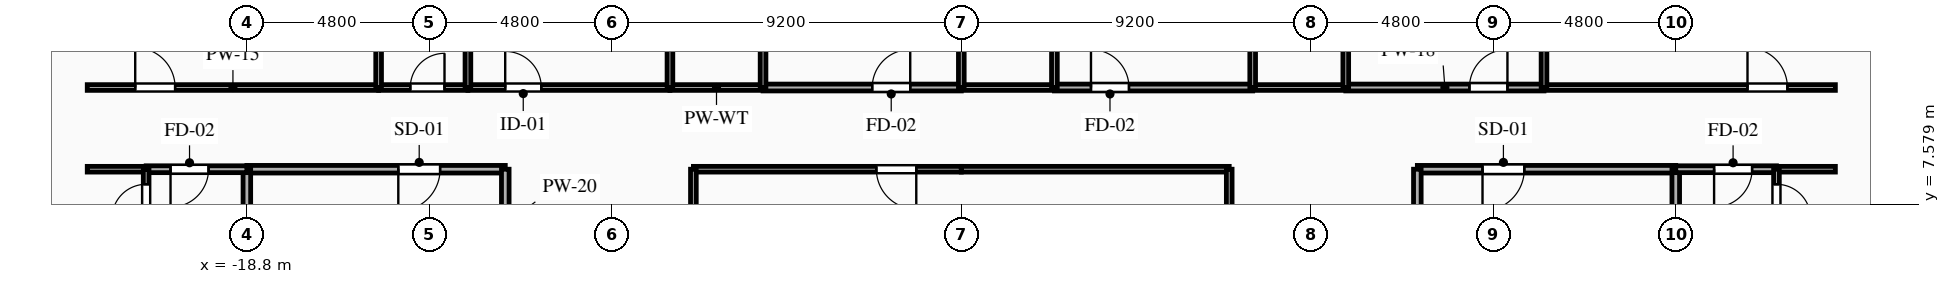
"""IFC4 building model, lengths in metres.
Left out: names, types, materials, properties, quantities, classifications, styles, units other than length and angle.
Written with IfcOpenShell. Run it as: python <this file> out.ifc"""

import sys

from ifc_helpers import new_model, si_unit, direction, frame, frame_2d, origin, place, context, subcontext, project, spatial, rectangle, extrude, element, fill, save


model = new_model("IFC4")
c1 = context("Model", 3, precision=1e-05, world=origin(), true_north=direction((0.0, 1.0)))
c2 = subcontext(c1, "Body", "Model", "MODEL_VIEW")
j1 = project(units=[si_unit("LENGTHUNIT", "METRE"), si_unit("PLANEANGLEUNIT", "RADIAN")], contexts=[c1])
p1 = place(None, origin())
s1 = spatial("IfcSite", under=j1, at=p1, CompositionType="ELEMENT")
p2 = place(p1, origin())
s2 = spatial("IfcBuilding", under=s1, at=p2, CompositionType="ELEMENT")
p3 = place(p2, frame((0.0, 0.0, 47.1)))
s3 = spatial("IfcBuildingStorey", under=s2, at=p3, CompositionType="ELEMENT", Elevation=47.1)
p4 = place(p3, frame((-12.0, 8.5, 0.0), z_axis=(0.0, 0.0, 1.0), x_axis=(-1.0, 0.0, 0.0)))
e1 = element("IfcWall", 1, at=p4, inside=s3, PredefinedType="PARTITIONING", context=c2, shape_type="SweptSolid", body=[
    extrude(rectangle(XDim=6.8, YDim=0.2, at=frame_2d((3.4, 0.0))), origin(), (0.0, 0.0, 1.0), 3.035),
])
p5 = place(p4, frame((1.715, 0.0, 0.0)))
e2 = element("IfcOpeningElement", 2, at=p5, cuts=e1, PredefinedType="OPENING", context=c2, shape_type="SweptSolid", body=[
    extrude(rectangle(XDim=1.1, YDim=2.15, at=frame_2d((0.55, 1.075))), frame((0.0, 0.11, 0.0), z_axis=(0.0, -1.0, 0.0), x_axis=(1.0, 0.0, 0.0)), (0.0, 0.0, 1.0), 0.22),
])
p6 = place(p3, frame((-12.0, 5.6, 0.0), z_axis=(0.0, 0.0, 1.0), x_axis=(0.0, 1.0, 0.0)))
e3 = element("IfcWall", 3, at=p6, inside=s3, PredefinedType="PARTITIONING", context=c2, shape_type="SweptSolid", body=[
    extrude(rectangle(XDim=2.9, YDim=0.2, at=frame_2d((1.45, 0.0))), origin(), (0.0, 0.0, 1.0), 3.035),
])
p7 = place(p3, frame((-18.8, 8.5, 0.0), z_axis=(0.0, 0.0, 1.0), x_axis=(0.0, -1.0, 0.0)))
e4 = element("IfcWall", 4, at=p7, inside=s3, PredefinedType="PARTITIONING", context=c2, shape_type="SweptSolid", body=[
    extrude(rectangle(XDim=2.9, YDim=0.2, at=frame_2d((1.45, 0.0))), origin(), (0.0, 0.0, 1.0), 2.52),
])
p8 = place(p3, frame((18.8, 8.5, 0.0), z_axis=(0.0, 0.0, 1.0), x_axis=(-1.0, 0.0, 0.0)))
e5 = element("IfcWall", 5, at=p8, inside=s3, PredefinedType="PARTITIONING", context=c2, shape_type="SweptSolid", body=[
    extrude(rectangle(XDim=6.8, YDim=0.2, at=frame_2d((3.4, 0.0))), origin(), (0.0, 0.0, 1.0), 3.035),
])
p9 = place(p8, frame((3.985, 0.0, 0.0)))
e6 = element("IfcOpeningElement", 6, at=p9, cuts=e5, PredefinedType="OPENING", context=c2, shape_type="SweptSolid", body=[
    extrude(rectangle(XDim=1.1, YDim=2.15, at=frame_2d((0.55, 1.075))), frame((0.0, 0.11, 0.0), z_axis=(0.0, -1.0, 0.0), x_axis=(1.0, 0.0, 0.0)), (0.0, 0.0, 1.0), 0.22),
])
p10 = place(p3, frame((12.0, 8.5, 0.0), z_axis=(0.0, 0.0, 1.0), x_axis=(0.0, -1.0, 0.0)))
e7 = element("IfcWall", 7, at=p10, inside=s3, PredefinedType="PARTITIONING", context=c2, shape_type="SweptSolid", body=[
    extrude(rectangle(XDim=2.9, YDim=0.2, at=frame_2d((1.45, 0.0))), origin(), (0.0, 0.0, 1.0), 3.035),
])
p11 = place(p3, frame((18.8, 5.6, 0.0), z_axis=(0.0, 0.0, 1.0), x_axis=(0.0, 1.0, 0.0)))
e8 = element("IfcWall", 8, at=p11, inside=s3, PredefinedType="PARTITIONING", context=c2, shape_type="SweptSolid", body=[
    extrude(rectangle(XDim=2.9, YDim=0.2, at=frame_2d((1.45, 0.0))), origin(), (0.0, 0.0, 1.0), 2.52),
])
p12 = place(p3, frame((-18.8, 8.5, 0.0), z_axis=(0.0, 0.0, 1.0), x_axis=(-1.0, 0.0, 0.0)))
e9 = element("IfcWall", 9, at=p12, inside=s3, PredefinedType="PARTITIONING", context=c2, shape_type="SweptSolid", body=[
    extrude(rectangle(XDim=2.65, YDim=0.18, at=frame_2d((1.325, 0.0))), origin(), (0.0, 0.0, 1.0), 3.035),
])
p13 = place(p12, frame((1.009, 0.0, 0.0)))
e10 = element("IfcOpeningElement", 10, at=p13, cuts=e9, PredefinedType="OPENING", context=c2, shape_type="SweptSolid", body=[
    extrude(rectangle(XDim=1.0, YDim=2.15, at=frame_2d((0.5, 1.075))), frame((0.0, 0.1, 0.0), z_axis=(0.0, -1.0, 0.0), x_axis=(1.0, 0.0, 0.0)), (0.0, 0.0, 1.0), 0.2),
])
p14 = place(p3, frame((-21.45, 8.5, 0.0), z_axis=(0.0, 0.0, 1.0), x_axis=(-1.0, 0.0, 0.0)))
e11 = element("IfcWall", 11, at=p14, inside=s3, PredefinedType="PARTITIONING", context=c2, shape_type="SweptSolid", body=[
    extrude(rectangle(XDim=1.55, YDim=0.15, at=frame_2d((0.775, 0.0))), origin(), (0.0, 0.0, 1.0), 3.035),
])
p15 = place(p3, frame((-23.0, 10.65, 0.0), z_axis=(0.0, 0.0, 1.0), x_axis=(1.0, 0.0, 0.0)))
e12 = element("IfcWall", 12, at=p15, inside=s3, PredefinedType="PARTITIONING", context=c2, shape_type="SweptSolid", body=[
    extrude(rectangle(XDim=7.667, YDim=0.15, at=frame_2d((3.833, 0.0))), origin(), (0.0, 0.0, 1.0), 3.035),
])
p16 = place(p15, frame((1.262, 0.0, 0.0)))
e13 = element("IfcOpeningElement", 13, at=p16, cuts=e12, PredefinedType="OPENING", context=c2, shape_type="SweptSolid", body=[
    extrude(rectangle(XDim=1.05, YDim=2.15, at=frame_2d((0.525, 1.075))), frame((0.0, 0.085, 0.0), z_axis=(0.0, -1.0, 0.0), x_axis=(1.0, 0.0, 0.0)), (0.0, 0.0, 1.0), 0.17),
])
p17 = place(p3, frame((-15.333, 10.65, 0.0), z_axis=(0.0, 0.0, 1.0), x_axis=(1.0, 0.0, 0.0)))
e14 = element("IfcWall", 14, at=p17, inside=s3, PredefinedType="PLUMBINGWALL", context=c2, shape_type="SweptSolid", body=[
    extrude(rectangle(XDim=2.35, YDim=0.15, at=frame_2d((1.175, 0.0))), origin(), (0.0, 0.0, 1.0), 3.035),
])
p18 = place(p17, frame((0.834, 0.0, 0.0)))
e15 = element("IfcOpeningElement", 15, at=p18, cuts=e14, PredefinedType="OPENING", context=c2, shape_type="SweptSolid", body=[
    extrude(rectangle(XDim=0.9, YDim=2.1, at=frame_2d((0.45, 1.05))), frame((0.0, 0.085, 0.0), z_axis=(0.0, -1.0, 0.0), x_axis=(1.0, 0.0, 0.0)), (0.0, 0.0, 1.0), 0.17),
])
p19 = place(p3, frame((-12.983, 10.65, 0.0), z_axis=(0.0, 0.0, 1.0), x_axis=(1.0, 0.0, 0.0)))
e16 = element("IfcWall", 16, at=p19, inside=s3, PredefinedType="PARTITIONING", context=c2, shape_type="SweptSolid", body=[
    extrude(rectangle(XDim=5.316, YDim=0.15, at=frame_2d((2.658, 0.0))), origin(), (0.0, 0.0, 1.0), 3.035),
])
p20 = place(p19, frame((0.981, 0.0, 0.0)))
e17 = element("IfcOpeningElement", 17, at=p20, cuts=e16, PredefinedType="OPENING", context=c2, shape_type="SweptSolid", body=[
    extrude(rectangle(XDim=0.95, YDim=2.1, at=frame_2d((0.475, 1.05))), frame((0.0, 0.085, 0.0), z_axis=(0.0, -1.0, 0.0), x_axis=(1.0, 0.0, 0.0)), (0.0, 0.0, 1.0), 0.17),
])
p21 = place(p3, frame((-5.217, 10.65, 0.0), z_axis=(0.0, 0.0, 1.0), x_axis=(1.0, 0.0, 0.0)))
e18 = element("IfcWall", 18, at=p21, inside=s3, PredefinedType="PARTITIONING", context=c2, shape_type="SweptSolid", body=[
    extrude(rectangle(XDim=5.217, YDim=0.18, at=frame_2d((2.608, 0.0))), origin(), (0.0, 0.0, 1.0), 3.035),
])
p22 = place(p21, frame((2.873, 0.0, 0.0)))
e19 = element("IfcOpeningElement", 19, at=p22, cuts=e18, PredefinedType="OPENING", context=c2, shape_type="SweptSolid", body=[
    extrude(rectangle(XDim=1.0, YDim=2.15, at=frame_2d((0.5, 1.075))), frame((0.0, 0.1, 0.0), z_axis=(0.0, -1.0, 0.0), x_axis=(1.0, 0.0, 0.0)), (0.0, 0.0, 1.0), 0.2),
])
p23 = place(p3, frame((-7.667, 10.65, 0.0), z_axis=(0.0, 0.0, 1.0), x_axis=(1.0, 0.0, 0.0)))
e20 = element("IfcWall", 20, at=p23, inside=s3, PredefinedType="PLUMBINGWALL", context=c2, shape_type="SweptSolid", body=[
    extrude(rectangle(XDim=2.45, YDim=0.15, at=frame_2d((1.225, 0.0))), origin(), (0.0, 0.0, 1.0), 3.035),
])
p24 = place(p3, frame((0.0, 8.5, 0.0), z_axis=(0.0, 0.0, 1.0), x_axis=(-1.0, 0.0, 0.0)))
e21 = element("IfcWall", 21, at=p24, inside=s3, PredefinedType="PARTITIONING", context=c2, shape_type="SweptSolid", body=[
    extrude(rectangle(XDim=7.05, YDim=0.15, at=frame_2d((3.525, 0.0))), origin(), (0.0, 0.0, 1.0), 3.035),
])
p25 = place(p24, frame((1.185, 0.0, 0.0)))
e22 = element("IfcOpeningElement", 22, at=p25, cuts=e21, PredefinedType="OPENING", context=c2, shape_type="SweptSolid", body=[
    extrude(rectangle(XDim=1.05, YDim=2.15, at=frame_2d((0.525, 1.075))), frame((0.0, 0.085, 0.0), z_axis=(0.0, -1.0, 0.0), x_axis=(1.0, 0.0, 0.0)), (0.0, 0.0, 1.0), 0.17),
])
p26 = place(p3, frame((21.45, 8.5, 0.0), z_axis=(0.0, 0.0, 1.0), x_axis=(-1.0, 0.0, 0.0)))
e23 = element("IfcWall", 23, at=p26, inside=s3, PredefinedType="PARTITIONING", context=c2, shape_type="SweptSolid", body=[
    extrude(rectangle(XDim=2.65, YDim=0.18, at=frame_2d((1.325, 0.0))), origin(), (0.0, 0.0, 1.0), 3.035),
])
p27 = place(p26, frame((0.641, 0.0, 0.0)))
e24 = element("IfcOpeningElement", 24, at=p27, cuts=e23, PredefinedType="OPENING", context=c2, shape_type="SweptSolid", body=[
    extrude(rectangle(XDim=1.0, YDim=2.15, at=frame_2d((0.5, 1.075))), frame((0.0, 0.1, 0.0), z_axis=(0.0, -1.0, 0.0), x_axis=(1.0, 0.0, 0.0)), (0.0, 0.0, 1.0), 0.2),
])
p28 = place(p3, frame((23.0, 8.5, 0.0), z_axis=(0.0, 0.0, 1.0), x_axis=(-1.0, 0.0, 0.0)))
e25 = element("IfcWall", 25, at=p28, inside=s3, PredefinedType="PARTITIONING", context=c2, shape_type="SweptSolid", body=[
    extrude(rectangle(XDim=1.55, YDim=0.15, at=frame_2d((0.775, 0.0))), origin(), (0.0, 0.0, 1.0), 3.035),
])
p29 = place(p3, frame((2.45, 10.65, 0.0), z_axis=(0.0, 0.0, 1.0), x_axis=(1.0, 0.0, 0.0)))
e26 = element("IfcWall", 26, at=p29, inside=s3, PredefinedType="PARTITIONING", context=c2, shape_type="SweptSolid", body=[
    extrude(rectangle(XDim=5.217, YDim=0.18, at=frame_2d((2.608, 0.0))), origin(), (0.0, 0.0, 1.0), 3.035),
])
p30 = place(p29, frame((0.962, 0.0, 0.0)))
e27 = element("IfcOpeningElement", 27, at=p30, cuts=e26, PredefinedType="OPENING", context=c2, shape_type="SweptSolid", body=[
    extrude(rectangle(XDim=1.0, YDim=2.15, at=frame_2d((0.5, 1.075))), frame((0.0, 0.1, 0.0), z_axis=(0.0, -1.0, 0.0), x_axis=(1.0, 0.0, 0.0)), (0.0, 0.0, 1.0), 0.2),
])
p31 = place(p3, frame((0.0, 10.65, 0.0), z_axis=(0.0, 0.0, 1.0), x_axis=(1.0, 0.0, 0.0)))
e28 = element("IfcWall", 28, at=p31, inside=s3, PredefinedType="PLUMBINGWALL", context=c2, shape_type="SweptSolid", body=[
    extrude(rectangle(XDim=2.45, YDim=0.15, at=frame_2d((1.225, 0.0))), origin(), (0.0, 0.0, 1.0), 3.035),
])
p32 = place(p3, frame((10.117, 10.65, 0.0), z_axis=(0.0, 0.0, 1.0), x_axis=(1.0, 0.0, 0.0)))
e29 = element("IfcWall", 29, at=p32, inside=s3, PredefinedType="PARTITIONING", context=c2, shape_type="SweptSolid", body=[
    extrude(rectangle(XDim=5.216, YDim=0.18, at=frame_2d((2.608, 0.0))), origin(), (0.0, 0.0, 1.0), 3.035),
])
p33 = place(p32, frame((3.254, 0.0, 0.0)))
e30 = element("IfcOpeningElement", 30, at=p33, cuts=e29, PredefinedType="OPENING", context=c2, shape_type="SweptSolid", body=[
    extrude(rectangle(XDim=1.0, YDim=2.15, at=frame_2d((0.5, 1.075))), frame((0.0, 0.1, 0.0), z_axis=(0.0, -1.0, 0.0), x_axis=(1.0, 0.0, 0.0)), (0.0, 0.0, 1.0), 0.2),
])
p34 = place(p3, frame((7.667, 10.65, 0.0), z_axis=(0.0, 0.0, 1.0), x_axis=(1.0, 0.0, 0.0)))
e31 = element("IfcWall", 31, at=p34, inside=s3, PredefinedType="PLUMBINGWALL", context=c2, shape_type="SweptSolid", body=[
    extrude(rectangle(XDim=2.45, YDim=0.15, at=frame_2d((1.225, 0.0))), origin(), (0.0, 0.0, 1.0), 3.035),
])
p35 = place(p3, frame((15.333, 10.65, 0.0), z_axis=(0.0, 0.0, 1.0), x_axis=(1.0, 0.0, 0.0)))
e32 = element("IfcWall", 32, at=p35, inside=s3, PredefinedType="PARTITIONING", context=c2, shape_type="SweptSolid", body=[
    extrude(rectangle(XDim=7.667, YDim=0.15, at=frame_2d((3.833, 0.0))), origin(), (0.0, 0.0, 1.0), 3.035),
])
p36 = place(p35, frame((5.355, 0.0, 0.0)))
e33 = element("IfcOpeningElement", 33, at=p36, cuts=e32, PredefinedType="OPENING", context=c2, shape_type="SweptSolid", body=[
    extrude(rectangle(XDim=1.05, YDim=2.15, at=frame_2d((0.525, 1.075))), frame((0.0, 0.085, 0.0), z_axis=(0.0, -1.0, 0.0), x_axis=(1.0, 0.0, 0.0)), (0.0, 0.0, 1.0), 0.17),
])
for number, where, z_axis, x_axis in (
    (34, (7.05, 8.5, 0.0), (0.0, 0.0, 1.0), (-1.0, 0.0, 0.0)),
    (35, (-7.05, 8.5, 0.0), (0.0, 0.0, 1.0), (0.0, -1.0, 0.0)),
    (36, (7.05, 1.45, 0.0), (0.0, 0.0, 1.0), (0.0, 1.0, 0.0)),
):
    element("IfcWall", number, at=place(p3, frame(where, z_axis=z_axis, x_axis=x_axis)), inside=s3, PredefinedType="PARTITIONING", context=c2, shape_type="SweptSolid", body=[
        extrude(rectangle(XDim=7.05, YDim=0.15, at=frame_2d((3.525, 0.0))), origin(), (0.0, 0.0, 1.0), 3.035),
    ])
p37 = place(p3, frame((-21.45, 6.808, 0.0), z_axis=(0.0, 0.0, 1.0), x_axis=(0.0, 1.0, 0.0)))
e37 = element("IfcWall", 37, at=p37, inside=s3, PredefinedType="PARTITIONING", context=c2, shape_type="SweptSolid", body=[
    extrude(rectangle(XDim=1.692, YDim=0.15, at=frame_2d((0.846, 0.0))), origin(), (0.0, 0.0, 1.0), 3.035),
])
p38 = place(p37, frame((0.396, 0.0, 0.0)))
e38 = element("IfcOpeningElement", 38, at=p38, cuts=e37, PredefinedType="OPENING", context=c2, shape_type="SweptSolid", body=[
    extrude(rectangle(XDim=0.9, YDim=2.1, at=frame_2d((0.45, 1.05))), frame((0.0, 0.085, 0.0), z_axis=(0.0, -1.0, 0.0), x_axis=(1.0, 0.0, 0.0)), (0.0, 0.0, 1.0), 0.17),
])
p39 = place(p3, frame((21.45, 8.5, 0.0), z_axis=(0.0, 0.0, 1.0), x_axis=(0.0, -1.0, 0.0)))
e39 = element("IfcWall", 39, at=p39, inside=s3, PredefinedType="PARTITIONING", context=c2, shape_type="SweptSolid", body=[
    extrude(rectangle(XDim=1.692, YDim=0.15, at=frame_2d((0.846, 0.0))), origin(), (0.0, 0.0, 1.0), 3.035),
])
p40 = place(p39, frame((0.396, 0.0, 0.0)))
e40 = element("IfcOpeningElement", 40, at=p40, cuts=e39, PredefinedType="OPENING", context=c2, shape_type="SweptSolid", body=[
    extrude(rectangle(XDim=0.9, YDim=2.1, at=frame_2d((0.45, 1.05))), frame((0.0, 0.085, 0.0), z_axis=(0.0, -1.0, 0.0), x_axis=(1.0, 0.0, 0.0)), (0.0, 0.0, 1.0), 0.17),
])
for number, where, z_axis, x_axis in (
    (41, (-15.333, 19.4, 0.0), (0.0, 0.0, 1.0), (0.0, -1.0, 0.0)),
    (42, (-12.983, 19.4, 0.0), (0.0, 0.0, 1.0), (0.0, -1.0, 0.0)),
):
    element("IfcWall", number, at=place(p3, frame(where, z_axis=z_axis, x_axis=x_axis)), inside=s3, PredefinedType="PLUMBINGWALL", context=c2, shape_type="SweptSolid", body=[
        extrude(rectangle(XDim=8.75, YDim=0.15, at=frame_2d((4.375, 0.0))), origin(), (0.0, 0.0, 1.0), 3.035),
    ])
for number, where, z_axis, x_axis in (
    (43, (-7.667, 12.8, 0.0), (0.0, 0.0, 1.0), (0.0, -1.0, 0.0)),
    (44, (-5.217, 10.65, 0.0), (0.0, 0.0, 1.0), (0.0, 1.0, 0.0)),
    (45, (0.0, 12.8, 0.0), (0.0, 0.0, 1.0), (0.0, -1.0, 0.0)),
    (46, (2.45, 10.65, 0.0), (0.0, 0.0, 1.0), (0.0, 1.0, 0.0)),
    (47, (7.667, 12.8, 0.0), (0.0, 0.0, 1.0), (0.0, -1.0, 0.0)),
    (48, (10.117, 10.65, 0.0), (0.0, 0.0, 1.0), (0.0, 1.0, 0.0)),
):
    element("IfcWall", number, at=place(p3, frame(where, z_axis=z_axis, x_axis=x_axis)), inside=s3, PredefinedType="PLUMBINGWALL", context=c2, shape_type="SweptSolid", body=[
        extrude(rectangle(XDim=2.15, YDim=0.15, at=frame_2d((1.075, 0.0))), origin(), (0.0, 0.0, 1.0), 3.035),
    ])
p41 = place(p3, frame((15.333, 19.4, 0.0), z_axis=(0.0, 0.0, 1.0), x_axis=(0.0, -1.0, 0.0)))
e49 = element("IfcWall", 49, at=p41, inside=s3, PredefinedType="PARTITIONING", context=c2, shape_type="SweptSolid", body=[
    extrude(rectangle(XDim=8.75, YDim=0.15, at=frame_2d((4.375, 0.0))), origin(), (0.0, 0.0, 1.0), 3.035),
])
p42 = place(p5, origin())
e50 = element("IfcDoor", 50, at=p42, inside=s3, OperationType="SINGLE_SWING_RIGHT", PredefinedType="DOOR", context=c2, shape_type="SweptSolid", body=[
    extrude(rectangle(XDim=1.1, YDim=2.15, at=frame_2d((0.55, 1.075))), frame((0.0, 0.025, 0.0), z_axis=(0.0, -1.0, 0.0), x_axis=(1.0, 0.0, 0.0)), (0.0, 0.0, 1.0), 0.05),
])
fill(e2, e50)
p43 = place(p9, origin())
e51 = element("IfcDoor", 51, at=p43, inside=s3, OperationType="SINGLE_SWING_RIGHT", PredefinedType="DOOR", context=c2, shape_type="SweptSolid", body=[
    extrude(rectangle(XDim=1.1, YDim=2.15, at=frame_2d((0.55, 1.075))), frame((0.0, 0.025, 0.0), z_axis=(0.0, -1.0, 0.0), x_axis=(1.0, 0.0, 0.0)), (0.0, 0.0, 1.0), 0.05),
])
fill(e6, e51)
p44 = place(p13, origin())
e52 = element("IfcDoor", 52, at=p44, inside=s3, OperationType="SINGLE_SWING_RIGHT", PredefinedType="DOOR", context=c2, shape_type="SweptSolid", body=[
    extrude(rectangle(XDim=1.0, YDim=2.15, at=frame_2d((0.5, 1.075))), frame((0.0, 0.025, 0.0), z_axis=(0.0, -1.0, 0.0), x_axis=(1.0, 0.0, 0.0)), (0.0, 0.0, 1.0), 0.05),
])
fill(e10, e52)
p45 = place(p16, origin())
e53 = element("IfcDoor", 53, at=p45, inside=s3, OperationType="SINGLE_SWING_LEFT", PredefinedType="DOOR", context=c2, shape_type="SweptSolid", body=[
    extrude(rectangle(XDim=1.05, YDim=2.15, at=frame_2d((0.525, 1.075))), frame((0.0, 0.025, 0.0), z_axis=(0.0, -1.0, 0.0), x_axis=(1.0, 0.0, 0.0)), (0.0, 0.0, 1.0), 0.05),
])
fill(e13, e53)
p46 = place(p18, origin())
e54 = element("IfcDoor", 54, at=p46, inside=s3, OperationType="SINGLE_SWING_RIGHT", PredefinedType="DOOR", context=c2, shape_type="SweptSolid", body=[
    extrude(rectangle(XDim=0.9, YDim=2.1, at=frame_2d((0.45, 1.05))), frame((0.0, 0.025, 0.0), z_axis=(0.0, -1.0, 0.0), x_axis=(1.0, 0.0, 0.0)), (0.0, 0.0, 1.0), 0.05),
])
fill(e15, e54)
p47 = place(p20, origin())
e55 = element("IfcDoor", 55, at=p47, inside=s3, OperationType="SINGLE_SWING_LEFT", PredefinedType="DOOR", context=c2, shape_type="SweptSolid", body=[
    extrude(rectangle(XDim=0.95, YDim=2.1, at=frame_2d((0.475, 1.05))), frame((0.0, 0.025, 0.0), z_axis=(0.0, -1.0, 0.0), x_axis=(1.0, 0.0, 0.0)), (0.0, 0.0, 1.0), 0.05),
])
fill(e17, e55)
p48 = place(p22, origin())
e56 = element("IfcDoor", 56, at=p48, inside=s3, OperationType="SINGLE_SWING_RIGHT", PredefinedType="DOOR", context=c2, shape_type="SweptSolid", body=[
    extrude(rectangle(XDim=1.0, YDim=2.15, at=frame_2d((0.5, 1.075))), frame((0.0, 0.025, 0.0), z_axis=(0.0, -1.0, 0.0), x_axis=(1.0, 0.0, 0.0)), (0.0, 0.0, 1.0), 0.05),
])
fill(e19, e56)
p49 = place(p25, origin())
e57 = element("IfcDoor", 57, at=p49, inside=s3, OperationType="SINGLE_SWING_LEFT", PredefinedType="DOOR", context=c2, shape_type="SweptSolid", body=[
    extrude(rectangle(XDim=1.05, YDim=2.15, at=frame_2d((0.525, 1.075))), frame((0.0, 0.025, 0.0), z_axis=(0.0, -1.0, 0.0), x_axis=(1.0, 0.0, 0.0)), (0.0, 0.0, 1.0), 0.05),
])
fill(e22, e57)
p50 = place(p27, origin())
e58 = element("IfcDoor", 58, at=p50, inside=s3, OperationType="SINGLE_SWING_RIGHT", PredefinedType="DOOR", context=c2, shape_type="SweptSolid", body=[
    extrude(rectangle(XDim=1.0, YDim=2.15, at=frame_2d((0.5, 1.075))), frame((0.0, 0.025, 0.0), z_axis=(0.0, -1.0, 0.0), x_axis=(1.0, 0.0, 0.0)), (0.0, 0.0, 1.0), 0.05),
])
fill(e24, e58)
p51 = place(p30, origin())
e59 = element("IfcDoor", 59, at=p51, inside=s3, OperationType="SINGLE_SWING_LEFT", PredefinedType="DOOR", context=c2, shape_type="SweptSolid", body=[
    extrude(rectangle(XDim=1.0, YDim=2.15, at=frame_2d((0.5, 1.075))), frame((0.0, 0.025, 0.0), z_axis=(0.0, -1.0, 0.0), x_axis=(1.0, 0.0, 0.0)), (0.0, 0.0, 1.0), 0.05),
])
fill(e27, e59)
p52 = place(p33, origin())
e60 = element("IfcDoor", 60, at=p52, inside=s3, OperationType="SINGLE_SWING_RIGHT", PredefinedType="DOOR", context=c2, shape_type="SweptSolid", body=[
    extrude(rectangle(XDim=1.0, YDim=2.15, at=frame_2d((0.5, 1.075))), frame((0.0, 0.025, 0.0), z_axis=(0.0, -1.0, 0.0), x_axis=(1.0, 0.0, 0.0)), (0.0, 0.0, 1.0), 0.05),
])
fill(e30, e60)
p53 = place(p36, origin())
e61 = element("IfcDoor", 61, at=p53, inside=s3, OperationType="SINGLE_SWING_LEFT", PredefinedType="DOOR", context=c2, shape_type="SweptSolid", body=[
    extrude(rectangle(XDim=1.05, YDim=2.15, at=frame_2d((0.525, 1.075))), frame((0.0, 0.025, 0.0), z_axis=(0.0, -1.0, 0.0), x_axis=(1.0, 0.0, 0.0)), (0.0, 0.0, 1.0), 0.05),
])
fill(e33, e61)
p54 = place(p38, origin())
e62 = element("IfcDoor", 62, at=p54, inside=s3, OperationType="SINGLE_SWING_LEFT", PredefinedType="DOOR", context=c2, shape_type="SweptSolid", body=[
    extrude(rectangle(XDim=0.9, YDim=2.1, at=frame_2d((0.45, 1.05))), frame((0.0, 0.025, 0.0), z_axis=(0.0, -1.0, 0.0), x_axis=(1.0, 0.0, 0.0)), (0.0, 0.0, 1.0), 0.05),
])
fill(e38, e62)
p55 = place(p40, origin())
e63 = element("IfcDoor", 63, at=p55, inside=s3, OperationType="SINGLE_SWING_RIGHT", PredefinedType="DOOR", context=c2, shape_type="SweptSolid", body=[
    extrude(rectangle(XDim=0.9, YDim=2.1, at=frame_2d((0.45, 1.05))), frame((0.0, 0.025, 0.0), z_axis=(0.0, -1.0, 0.0), x_axis=(1.0, 0.0, 0.0)), (0.0, 0.0, 1.0), 0.05),
])
fill(e40, e63)
save(model, sys.argv[1])
